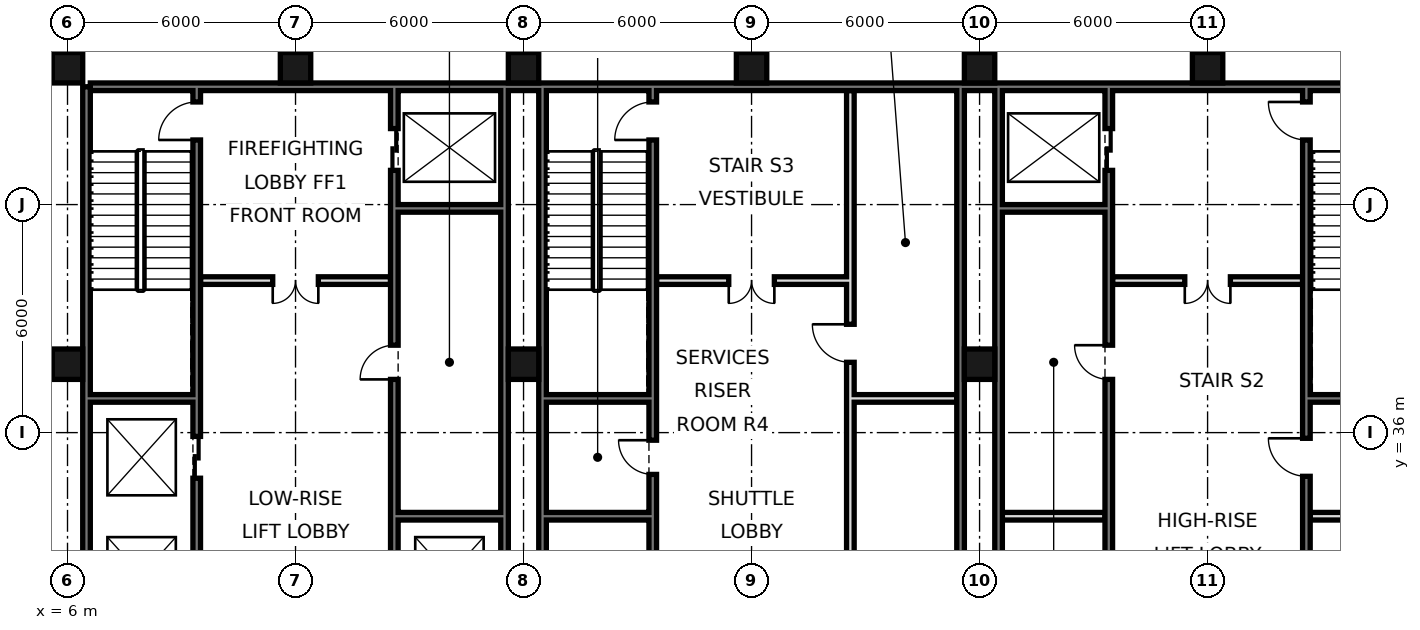
"""IFC4 building model, lengths in metres.
Left out: names, types, materials, properties, quantities, classifications, styles, units other than length and angle.
Written with IfcOpenShell. Run it as: python <this file> out.ifc"""

import sys

from ifc_helpers import new_model, si_unit, direction, frame, frame_2d, origin, origin_2d, place, context, subcontext, project, spatial, rectangle, hollow_rectangle, extrude, element, fill, save


model = new_model("IFC4")
c1 = context("Model", 3, precision=1e-05, world=origin(), true_north=direction((0.0, 1.0)))
c2 = subcontext(c1, "Body", "Model", "MODEL_VIEW")
j1 = project(units=[si_unit("LENGTHUNIT", "METRE"), si_unit("PLANEANGLEUNIT", "RADIAN")], contexts=[c1])
p1 = place(None, origin())
s1 = spatial("IfcSite", under=j1, at=p1, CompositionType="ELEMENT")
p2 = place(p1, origin())
s2 = spatial("IfcBuilding", under=s1, at=p2, CompositionType="ELEMENT")
p3 = place(p2, frame((0.0, 0.0, 30.0)))
s3 = spatial("IfcBuildingStorey", under=s2, at=p3, CompositionType="ELEMENT", Elevation=30.0)
for number, where, z_axis, x_axis in (
    (1, (6.0, 37.8, 0.0), (0.0, 0.0, 1.0), (1.0, 0.0, 0.0)),
    (2, (6.0, 45.6, 0.0), (0.0, 0.0, 1.0), (1.0, 0.0, 0.0)),
    (3, (12.0, 45.6, 0.0), (0.0, 0.0, 1.0), (1.0, 0.0, 0.0)),
    (4, (18.0, 37.8, 0.0), (0.0, 0.0, 1.0), (1.0, 0.0, 0.0)),
    (5, (18.0, 45.6, 0.0), (0.0, 0.0, 1.0), (1.0, 0.0, 0.0)),
    (6, (24.0, 45.6, 0.0), (0.0, 0.0, 1.0), (1.0, 0.0, 0.0)),
    (7, (30.0, 37.8, 0.0), (0.0, 0.0, 1.0), (1.0, 0.0, 0.0)),
    (8, (30.0, 45.6, 0.0), (0.0, 0.0, 1.0), (1.0, 0.0, 0.0)),
    (9, (36.0, 45.6, 0.0), (0.0, 0.0, 1.0), (1.0, 0.0, 0.0)),
):
    element("IfcColumn", number, at=place(p3, frame(where, z_axis=z_axis, x_axis=x_axis)), inside=s3, PredefinedType="COLUMN", context=c2, shape_type="SweptSolid", body=[
        extrude(hollow_rectangle(XDim=0.8, YDim=0.8, WallThickness=0.07, at=origin_2d()), origin(), (0.0, 0.0, 1.0), 4.8),
    ])
p4 = place(p3, frame((6.5, 21.6, 0.0), z_axis=(0.0, 0.0, 1.0), x_axis=(0.0, 1.0, 0.0)))
e10 = element("IfcWall", 10, at=p4, inside=s3, PredefinedType="SOLIDWALL", context=c2, shape_type="SweptSolid", body=[
    extrude(rectangle(XDim=23.5, YDim=0.2, at=frame_2d((11.75, 0.0))), origin(), (0.0, 0.0, 1.0), 4.4),
])
p5 = place(p3, frame((6.6, 45.1, 0.0), z_axis=(0.0, 0.0, 1.0), x_axis=(1.0, 0.0, 0.0)))
e11 = element("IfcWall", 11, at=p5, inside=s3, PredefinedType="SOLIDWALL", context=c2, shape_type="SweptSolid", body=[
    extrude(rectangle(XDim=34.8, YDim=0.2, at=frame_2d((17.4, 0.0))), origin(), (0.0, 0.0, 1.0), 4.4),
])
for number, where, z_axis, x_axis in (
    (12, (17.5, 27.6, 0.0), (0.0, 0.0, 1.0), (0.0, 1.0, 0.0)),
    (13, (18.5, 27.6, 0.0), (0.0, 0.0, 1.0), (0.0, 1.0, 0.0)),
    (14, (29.5, 27.6, 0.0), (0.0, 0.0, 1.0), (0.0, 1.0, 0.0)),
    (15, (30.5, 27.6, 0.0), (0.0, 0.0, 1.0), (0.0, 1.0, 0.0)),
):
    element("IfcWall", number, at=place(p3, frame(where, z_axis=z_axis, x_axis=x_axis)), inside=s3, PredefinedType="SOLIDWALL", context=c2, shape_type="SweptSolid", body=[
        extrude(rectangle(XDim=17.5, YDim=0.2, at=frame_2d((8.75, 0.0))), origin(), (0.0, 0.0, 1.0), 4.4),
    ])
p6 = place(p3, frame((14.6, 27.5, 0.0), z_axis=(0.0, 0.0, 1.0), x_axis=(0.0, 1.0, 0.0)))
e16 = element("IfcWall", 16, at=p6, inside=s3, PredefinedType="SOLIDWALL", context=c2, shape_type="SweptSolid", body=[
    extrude(rectangle(XDim=17.5, YDim=0.2, at=frame_2d((8.75, 0.0))), origin(), (0.0, 0.0, 1.0), 4.4),
])
p7 = place(p6, frame((1.1, 0.0, 0.0)))
e17 = element("IfcOpeningElement", 17, at=p7, cuts=e16, PredefinedType="OPENING", context=c2, shape_type="SweptSolid", body=[
    extrude(rectangle(XDim=1.1, YDim=2.1, at=frame_2d((0.55, 1.05))), frame((0.0, 0.11, 0.0), z_axis=(0.0, -1.0, 0.0), x_axis=(1.0, 0.0, 0.0)), (0.0, 0.0, 1.0), 0.22),
])
p8 = place(p6, frame((4.2, 0.0, 0.0)))
e18 = element("IfcOpeningElement", 18, at=p8, cuts=e16, PredefinedType="OPENING", context=c2, shape_type="SweptSolid", body=[
    extrude(rectangle(XDim=1.1, YDim=2.1, at=frame_2d((0.55, 1.05))), frame((0.0, 0.11, 0.0), z_axis=(0.0, -1.0, 0.0), x_axis=(1.0, 0.0, 0.0)), (0.0, 0.0, 1.0), 0.22),
])
p9 = place(p6, frame((15.4, 0.0, 0.0)))
e19 = element("IfcOpeningElement", 19, at=p9, cuts=e16, PredefinedType="OPENING", context=c2, shape_type="SweptSolid", body=[
    extrude(rectangle(XDim=1.1, YDim=2.1, at=frame_2d((0.55, 1.05))), frame((0.0, 0.11, 0.0), z_axis=(0.0, -1.0, 0.0), x_axis=(1.0, 0.0, 0.0)), (0.0, 0.0, 1.0), 0.22),
])
p10 = place(p6, frame((9.9, 0.0, 0.0)))
e20 = element("IfcOpeningElement", 20, at=p10, cuts=e16, PredefinedType="OPENING", context=c2, shape_type="SweptSolid", body=[
    extrude(rectangle(XDim=0.9, YDim=2.1, at=frame_2d((0.45, 1.05))), frame((0.0, 0.11, 0.0), z_axis=(0.0, -1.0, 0.0), x_axis=(1.0, 0.0, 0.0)), (0.0, 0.0, 1.0), 0.22),
])
p11 = place(p3, frame((21.4, 27.5, 0.0), z_axis=(0.0, 0.0, 1.0), x_axis=(0.0, 1.0, 0.0)))
e21 = element("IfcWall", 21, at=p11, inside=s3, PredefinedType="SOLIDWALL", context=c2, shape_type="SweptSolid", body=[
    extrude(rectangle(XDim=17.5, YDim=0.2, at=frame_2d((8.75, 0.0))), origin(), (0.0, 0.0, 1.0), 4.4),
])
p12 = place(p11, frame((16.2, 0.0, 0.0)))
e22 = element("IfcOpeningElement", 22, at=p12, cuts=e21, PredefinedType="OPENING", context=c2, shape_type="SweptSolid", body=[
    extrude(rectangle(XDim=1.0, YDim=2.1, at=frame_2d((0.5, 1.05))), frame((0.0, 0.11, 0.0), z_axis=(0.0, -1.0, 0.0), x_axis=(1.0, 0.0, 0.0)), (0.0, 0.0, 1.0), 0.22),
])
p13 = place(p11, frame((7.4, 0.0, 0.0)))
e23 = element("IfcOpeningElement", 23, at=p13, cuts=e21, PredefinedType="OPENING", context=c2, shape_type="SweptSolid", body=[
    extrude(rectangle(XDim=0.9, YDim=2.1, at=frame_2d((0.45, 1.05))), frame((0.0, 0.11, 0.0), z_axis=(0.0, -1.0, 0.0), x_axis=(1.0, 0.0, 0.0)), (0.0, 0.0, 1.0), 0.22),
])
p14 = place(p3, frame((26.6, 27.5, 0.0), z_axis=(0.0, 0.0, 1.0), x_axis=(0.0, 1.0, 0.0)))
e24 = element("IfcWall", 24, at=p14, inside=s3, PredefinedType="SOLIDWALL", context=c2, shape_type="SweptSolid", body=[
    extrude(rectangle(XDim=17.5, YDim=0.2, at=frame_2d((8.75, 0.0))), origin(), (0.0, 0.0, 1.0), 4.4),
])
p15 = place(p14, frame((4.3, 0.0, 0.0)))
e25 = element("IfcOpeningElement", 25, at=p15, cuts=e24, PredefinedType="OPENING", context=c2, shape_type="SweptSolid", body=[
    extrude(rectangle(XDim=0.9, YDim=2.1, at=frame_2d((0.45, 1.05))), frame((0.0, 0.11, 0.0), z_axis=(0.0, -1.0, 0.0), x_axis=(1.0, 0.0, 0.0)), (0.0, 0.0, 1.0), 0.22),
])
p16 = place(p14, frame((10.35, 0.0, 0.0)))
e26 = element("IfcOpeningElement", 26, at=p16, cuts=e24, PredefinedType="OPENING", context=c2, shape_type="SweptSolid", body=[
    extrude(rectangle(XDim=1.0, YDim=2.1, at=frame_2d((0.5, 1.05))), frame((0.0, 0.11, 0.0), z_axis=(0.0, -1.0, 0.0), x_axis=(1.0, 0.0, 0.0)), (0.0, 0.0, 1.0), 0.22),
])
p17 = place(p3, frame((33.4, 27.5, 0.0), z_axis=(0.0, 0.0, 1.0), x_axis=(0.0, 1.0, 0.0)))
e27 = element("IfcWall", 27, at=p17, inside=s3, PredefinedType="SOLIDWALL", context=c2, shape_type="SweptSolid", body=[
    extrude(rectangle(XDim=17.5, YDim=0.2, at=frame_2d((8.75, 0.0))), origin(), (0.0, 0.0, 1.0), 4.4),
])
p18 = place(p17, frame((15.4, 0.0, 0.0)))
e28 = element("IfcOpeningElement", 28, at=p18, cuts=e27, PredefinedType="OPENING", context=c2, shape_type="SweptSolid", body=[
    extrude(rectangle(XDim=1.1, YDim=2.1, at=frame_2d((0.55, 1.05))), frame((0.0, 0.11, 0.0), z_axis=(0.0, -1.0, 0.0), x_axis=(1.0, 0.0, 0.0)), (0.0, 0.0, 1.0), 0.22),
])
p19 = place(p17, frame((2.7, 0.0, 0.0)))
e29 = element("IfcOpeningElement", 29, at=p19, cuts=e27, PredefinedType="OPENING", context=c2, shape_type="SweptSolid", body=[
    extrude(rectangle(XDim=1.0, YDim=2.1, at=frame_2d((0.5, 1.05))), frame((0.0, 0.11, 0.0), z_axis=(0.0, -1.0, 0.0), x_axis=(1.0, 0.0, 0.0)), (0.0, 0.0, 1.0), 0.22),
])
p20 = place(p17, frame((9.9, 0.0, 0.0)))
e30 = element("IfcOpeningElement", 30, at=p20, cuts=e27, PredefinedType="OPENING", context=c2, shape_type="SweptSolid", body=[
    extrude(rectangle(XDim=0.9, YDim=2.1, at=frame_2d((0.45, 1.05))), frame((0.0, 0.11, 0.0), z_axis=(0.0, -1.0, 0.0), x_axis=(1.0, 0.0, 0.0)), (0.0, 0.0, 1.0), 0.22),
])
p21 = place(p3, frame((38.6, 21.6, 0.0), z_axis=(0.0, 0.0, 1.0), x_axis=(0.0, 1.0, 0.0)))
e31 = element("IfcWall", 31, at=p21, inside=s3, PredefinedType="SOLIDWALL", context=c2, shape_type="SweptSolid", body=[
    extrude(rectangle(XDim=23.4, YDim=0.2, at=frame_2d((11.7, 0.0))), origin(), (0.0, 0.0, 1.0), 4.4),
])
p22 = place(p21, frame((8.6, 0.0, 0.0)))
e32 = element("IfcOpeningElement", 32, at=p22, cuts=e31, PredefinedType="OPENING", context=c2, shape_type="SweptSolid", body=[
    extrude(rectangle(XDim=1.0, YDim=2.1, at=frame_2d((0.5, 1.05))), frame((0.0, 0.11, 0.0), z_axis=(0.0, -1.0, 0.0), x_axis=(1.0, 0.0, 0.0)), (0.0, 0.0, 1.0), 0.22),
])
p23 = place(p21, frame((13.25, 0.0, 0.0)))
e33 = element("IfcOpeningElement", 33, at=p23, cuts=e31, PredefinedType="OPENING", context=c2, shape_type="SweptSolid", body=[
    extrude(rectangle(XDim=1.0, YDim=2.1, at=frame_2d((0.5, 1.05))), frame((0.0, 0.11, 0.0), z_axis=(0.0, -1.0, 0.0), x_axis=(1.0, 0.0, 0.0)), (0.0, 0.0, 1.0), 0.22),
])
p24 = place(p21, frame((22.1, 0.0, 0.0)))
e34 = element("IfcOpeningElement", 34, at=p24, cuts=e31, PredefinedType="OPENING", context=c2, shape_type="SweptSolid", body=[
    extrude(rectangle(XDim=1.0, YDim=2.1, at=frame_2d((0.5, 1.05))), frame((0.0, 0.11, 0.0), z_axis=(0.0, -1.0, 0.0), x_axis=(1.0, 0.0, 0.0)), (0.0, 0.0, 1.0), 0.22),
])
p25 = place(p21, frame((0.175, 0.0, 0.0)))
e35 = element("IfcOpeningElement", 35, at=p25, cuts=e31, PredefinedType="OPENING", context=c2, shape_type="SweptSolid", body=[
    extrude(rectangle(XDim=0.9, YDim=2.1, at=frame_2d((0.45, 1.05))), frame((0.0, 0.11, 0.0), z_axis=(0.0, -1.0, 0.0), x_axis=(1.0, 0.0, 0.0)), (0.0, 0.0, 1.0), 0.22),
])
p26 = place(p3, frame((9.4, 21.6, 0.0), z_axis=(0.0, 0.0, 1.0), x_axis=(0.0, 1.0, 0.0)))
e36 = element("IfcWall", 36, at=p26, inside=s3, PredefinedType="SOLIDWALL", context=c2, shape_type="SweptSolid", body=[
    extrude(rectangle(XDim=23.4, YDim=0.2, at=frame_2d((11.7, 0.0))), origin(), (0.0, 0.0, 1.0), 4.4),
])
p27 = place(p26, frame((7.0, 0.0, 0.0)))
e37 = element("IfcOpeningElement", 37, at=p27, cuts=e36, PredefinedType="OPENING", context=c2, shape_type="SweptSolid", body=[
    extrude(rectangle(XDim=1.1, YDim=2.1, at=frame_2d((0.55, 1.05))), frame((0.0, 0.11, 0.0), z_axis=(0.0, -1.0, 0.0), x_axis=(1.0, 0.0, 0.0)), (0.0, 0.0, 1.0), 0.22),
])
p28 = place(p26, frame((10.1, 0.0, 0.0)))
e38 = element("IfcOpeningElement", 38, at=p28, cuts=e36, PredefinedType="OPENING", context=c2, shape_type="SweptSolid", body=[
    extrude(rectangle(XDim=1.1, YDim=2.1, at=frame_2d((0.55, 1.05))), frame((0.0, 0.11, 0.0), z_axis=(0.0, -1.0, 0.0), x_axis=(1.0, 0.0, 0.0)), (0.0, 0.0, 1.0), 0.22),
])
p29 = place(p26, frame((13.2, 0.0, 0.0)))
e39 = element("IfcOpeningElement", 39, at=p29, cuts=e36, PredefinedType="OPENING", context=c2, shape_type="SweptSolid", body=[
    extrude(rectangle(XDim=1.1, YDim=2.1, at=frame_2d((0.55, 1.05))), frame((0.0, 0.11, 0.0), z_axis=(0.0, -1.0, 0.0), x_axis=(1.0, 0.0, 0.0)), (0.0, 0.0, 1.0), 0.22),
])
p30 = place(p26, frame((22.1, 0.0, 0.0)))
e40 = element("IfcOpeningElement", 40, at=p30, cuts=e36, PredefinedType="OPENING", context=c2, shape_type="SweptSolid", body=[
    extrude(rectangle(XDim=1.0, YDim=2.1, at=frame_2d((0.5, 1.05))), frame((0.0, 0.11, 0.0), z_axis=(0.0, -1.0, 0.0), x_axis=(1.0, 0.0, 0.0)), (0.0, 0.0, 1.0), 0.22),
])
p31 = place(p26, frame((0.175, 0.0, 0.0)))
e41 = element("IfcOpeningElement", 41, at=p31, cuts=e36, PredefinedType="OPENING", context=c2, shape_type="SweptSolid", body=[
    extrude(rectangle(XDim=0.9, YDim=2.1, at=frame_2d((0.45, 1.05))), frame((0.0, 0.11, 0.0), z_axis=(0.0, -1.0, 0.0), x_axis=(1.0, 0.0, 0.0)), (0.0, 0.0, 1.0), 0.22),
])
for number, where, z_axis, x_axis in (
    (42, (14.7, 33.8, 0.0), (0.0, 0.0, 1.0), (1.0, 0.0, 0.0)),
    (43, (18.6, 33.8, 0.0), (0.0, 0.0, 1.0), (1.0, 0.0, 0.0)),
    (44, (30.6, 33.8, 0.0), (0.0, 0.0, 1.0), (1.0, 0.0, 0.0)),
):
    element("IfcWall", number, at=place(p3, frame(where, z_axis=z_axis, x_axis=x_axis)), inside=s3, PredefinedType="SOLIDWALL", context=c2, shape_type="SweptSolid", body=[
        extrude(rectangle(XDim=2.7, YDim=0.2, at=frame_2d((1.35, 0.0))), origin(), (0.0, 0.0, 1.0), 4.4),
    ])
p32 = place(p3, frame((38.7, 33.8, 0.0), z_axis=(0.0, 0.0, 1.0), x_axis=(1.0, 0.0, 0.0)))
e45 = element("IfcWall", 45, at=p32, inside=s3, PredefinedType="PARTITIONING", context=c2, shape_type="SweptSolid", body=[
    extrude(rectangle(XDim=2.7, YDim=0.2, at=frame_2d((1.35, 0.0))), origin(), (0.0, 0.0, 1.0), 4.4),
])
for number, where, z_axis, x_axis in (
    (46, (18.6, 36.9, 0.0), (0.0, 0.0, 1.0), (1.0, 0.0, 0.0)),
    (47, (26.7, 36.9, 0.0), (0.0, 0.0, 1.0), (1.0, 0.0, 0.0)),
    (48, (38.7, 36.9, 0.0), (0.0, 0.0, 1.0), (1.0, 0.0, 0.0)),
    (49, (6.6, 36.9, 0.0), (0.0, 0.0, 1.0), (1.0, 0.0, 0.0)),
):
    element("IfcWall", number, at=place(p3, frame(where, z_axis=z_axis, x_axis=x_axis)), inside=s3, PredefinedType="SOLIDWALL", context=c2, shape_type="SweptSolid", body=[
        extrude(rectangle(XDim=2.7, YDim=0.2, at=frame_2d((1.35, 0.0))), origin(), (0.0, 0.0, 1.0), 4.4),
    ])
p33 = place(p3, frame((21.5, 40.0, 0.0), z_axis=(0.0, 0.0, 1.0), x_axis=(1.0, 0.0, 0.0)))
e50 = element("IfcWall", 50, at=p33, inside=s3, PredefinedType="PARTITIONING", context=c2, shape_type="SweptSolid", body=[
    extrude(rectangle(XDim=5.0, YDim=0.2, at=frame_2d((2.5, 0.0))), origin(), (0.0, 0.0, 1.0), 4.4),
])
p34 = place(p33, frame((1.9, 0.0, 0.0)))
e51 = element("IfcOpeningElement", 51, at=p34, cuts=e50, PredefinedType="OPENING", context=c2, shape_type="SweptSolid", body=[
    extrude(rectangle(XDim=1.2, YDim=2.1, at=frame_2d((0.6, 1.05))), frame((0.0, 0.11, 0.0), z_axis=(0.0, -1.0, 0.0), x_axis=(1.0, 0.0, 0.0)), (0.0, 0.0, 1.0), 0.22),
])
p35 = place(p3, frame((33.5, 40.0, 0.0), z_axis=(0.0, 0.0, 1.0), x_axis=(1.0, 0.0, 0.0)))
e52 = element("IfcWall", 52, at=p35, inside=s3, PredefinedType="PARTITIONING", context=c2, shape_type="SweptSolid", body=[
    extrude(rectangle(XDim=5.0, YDim=0.2, at=frame_2d((2.5, 0.0))), origin(), (0.0, 0.0, 1.0), 4.4),
])
p36 = place(p35, frame((1.9, 0.0, 0.0)))
e53 = element("IfcOpeningElement", 53, at=p36, cuts=e52, PredefinedType="OPENING", context=c2, shape_type="SweptSolid", body=[
    extrude(rectangle(XDim=1.2, YDim=2.1, at=frame_2d((0.6, 1.05))), frame((0.0, 0.11, 0.0), z_axis=(0.0, -1.0, 0.0), x_axis=(1.0, 0.0, 0.0)), (0.0, 0.0, 1.0), 0.22),
])
p37 = place(p3, frame((9.5, 40.0, 0.0), z_axis=(0.0, 0.0, 1.0), x_axis=(1.0, 0.0, 0.0)))
e54 = element("IfcWall", 54, at=p37, inside=s3, PredefinedType="PARTITIONING", context=c2, shape_type="SweptSolid", body=[
    extrude(rectangle(XDim=5.0, YDim=0.2, at=frame_2d((2.5, 0.0))), origin(), (0.0, 0.0, 1.0), 4.4),
])
p38 = place(p37, frame((1.9, 0.0, 0.0)))
e55 = element("IfcOpeningElement", 55, at=p38, cuts=e54, PredefinedType="OPENING", context=c2, shape_type="SweptSolid", body=[
    extrude(rectangle(XDim=1.2, YDim=2.1, at=frame_2d((0.6, 1.05))), frame((0.0, 0.11, 0.0), z_axis=(0.0, -1.0, 0.0), x_axis=(1.0, 0.0, 0.0)), (0.0, 0.0, 1.0), 0.22),
])
for number, where, z_axis, x_axis in (
    (56, (14.7, 41.9, 0.0), (0.0, 0.0, 1.0), (1.0, 0.0, 0.0)),
    (57, (30.6, 41.9, 0.0), (0.0, 0.0, 1.0), (1.0, 0.0, 0.0)),
):
    element("IfcWall", number, at=place(p3, frame(where, z_axis=z_axis, x_axis=x_axis)), inside=s3, PredefinedType="SOLIDWALL", context=c2, shape_type="SweptSolid", body=[
        extrude(rectangle(XDim=2.7, YDim=0.2, at=frame_2d((1.35, 0.0))), origin(), (0.0, 0.0, 1.0), 4.4),
    ])
p39 = place(p38, frame((1.2, 0.0, 0.0), z_axis=(0.0, 0.0, 1.0), x_axis=(-1.0, 0.0, 0.0)))
e58 = element("IfcDoor", 58, at=p39, inside=s3, OperationType="DOUBLE_DOOR_SINGLE_SWING", PredefinedType="DOOR", context=c2, shape_type="SweptSolid", body=[
    extrude(rectangle(XDim=1.2, YDim=2.1, at=frame_2d((0.6, 1.05))), frame((0.0, 0.025, 0.0), z_axis=(0.0, -1.0, 0.0), x_axis=(1.0, 0.0, 0.0)), (0.0, 0.0, 1.0), 0.05),
])
fill(e55, e58)
p40 = place(p34, frame((1.2, 0.0, 0.0), z_axis=(0.0, 0.0, 1.0), x_axis=(-1.0, 0.0, 0.0)))
e59 = element("IfcDoor", 59, at=p40, inside=s3, OperationType="DOUBLE_DOOR_SINGLE_SWING", PredefinedType="DOOR", context=c2, shape_type="SweptSolid", body=[
    extrude(rectangle(XDim=1.2, YDim=2.1, at=frame_2d((0.6, 1.05))), frame((0.0, 0.025, 0.0), z_axis=(0.0, -1.0, 0.0), x_axis=(1.0, 0.0, 0.0)), (0.0, 0.0, 1.0), 0.05),
])
fill(e51, e59)
p41 = place(p36, frame((1.2, 0.0, 0.0), z_axis=(0.0, 0.0, 1.0), x_axis=(-1.0, 0.0, 0.0)))
e60 = element("IfcDoor", 60, at=p41, inside=s3, OperationType="DOUBLE_DOOR_SINGLE_SWING", PredefinedType="DOOR", context=c2, shape_type="SweptSolid", body=[
    extrude(rectangle(XDim=1.2, YDim=2.1, at=frame_2d((0.6, 1.05))), frame((0.0, 0.025, 0.0), z_axis=(0.0, -1.0, 0.0), x_axis=(1.0, 0.0, 0.0)), (0.0, 0.0, 1.0), 0.05),
])
fill(e53, e60)
p42 = place(p18, origin())
e61 = element("IfcDoor", 61, at=p42, inside=s3, OperationType="DOUBLE_DOOR_SLIDING", PredefinedType="DOOR", context=c2, shape_type="SweptSolid", body=[
    extrude(rectangle(XDim=1.1, YDim=2.1, at=frame_2d((0.55, 1.05))), frame((0.0, 0.025, 0.0), z_axis=(0.0, -1.0, 0.0), x_axis=(1.0, 0.0, 0.0)), (0.0, 0.0, 1.0), 0.05),
])
fill(e28, e61)
p43 = place(p9, origin())
e62 = element("IfcDoor", 62, at=p43, inside=s3, OperationType="DOUBLE_DOOR_SLIDING", PredefinedType="DOOR", context=c2, shape_type="SweptSolid", body=[
    extrude(rectangle(XDim=1.1, YDim=2.1, at=frame_2d((0.55, 1.05))), frame((0.0, 0.025, 0.0), z_axis=(0.0, -1.0, 0.0), x_axis=(1.0, 0.0, 0.0)), (0.0, 0.0, 1.0), 0.05),
])
fill(e19, e62)
p44 = place(p29, origin())
e63 = element("IfcDoor", 63, at=p44, inside=s3, OperationType="DOUBLE_DOOR_SLIDING", PredefinedType="DOOR", context=c2, shape_type="SweptSolid", body=[
    extrude(rectangle(XDim=1.1, YDim=2.1, at=frame_2d((0.55, 1.05))), frame((0.0, 0.025, 0.0), z_axis=(0.0, -1.0, 0.0), x_axis=(1.0, 0.0, 0.0)), (0.0, 0.0, 1.0), 0.05),
])
fill(e39, e63)
p45 = place(p23, frame((1.0, 0.0, 0.0), z_axis=(0.0, 0.0, 1.0), x_axis=(-1.0, 0.0, 0.0)))
e64 = element("IfcDoor", 64, at=p45, inside=s3, OperationType="SINGLE_SWING_LEFT", PredefinedType="DOOR", context=c2, shape_type="SweptSolid", body=[
    extrude(rectangle(XDim=1.0, YDim=2.1, at=frame_2d((0.5, 1.05))), frame((0.0, 0.025, 0.0), z_axis=(0.0, -1.0, 0.0), x_axis=(1.0, 0.0, 0.0)), (0.0, 0.0, 1.0), 0.05),
])
fill(e33, e64)
p46 = place(p30, origin())
e65 = element("IfcDoor", 65, at=p46, inside=s3, OperationType="SINGLE_SWING_LEFT", PredefinedType="DOOR", context=c2, shape_type="SweptSolid", body=[
    extrude(rectangle(XDim=1.0, YDim=2.1, at=frame_2d((0.5, 1.05))), frame((0.0, 0.025, 0.0), z_axis=(0.0, -1.0, 0.0), x_axis=(1.0, 0.0, 0.0)), (0.0, 0.0, 1.0), 0.05),
])
fill(e40, e65)
p47 = place(p24, frame((1.0, 0.0, 0.0), z_axis=(0.0, 0.0, 1.0), x_axis=(-1.0, 0.0, 0.0)))
e66 = element("IfcDoor", 66, at=p47, inside=s3, OperationType="SINGLE_SWING_LEFT", PredefinedType="DOOR", context=c2, shape_type="SweptSolid", body=[
    extrude(rectangle(XDim=1.0, YDim=2.1, at=frame_2d((0.5, 1.05))), frame((0.0, 0.025, 0.0), z_axis=(0.0, -1.0, 0.0), x_axis=(1.0, 0.0, 0.0)), (0.0, 0.0, 1.0), 0.05),
])
fill(e34, e66)
p48 = place(p12, origin())
e67 = element("IfcDoor", 67, at=p48, inside=s3, OperationType="SINGLE_SWING_LEFT", PredefinedType="DOOR", context=c2, shape_type="SweptSolid", body=[
    extrude(rectangle(XDim=1.0, YDim=2.1, at=frame_2d((0.5, 1.05))), frame((0.0, 0.025, 0.0), z_axis=(0.0, -1.0, 0.0), x_axis=(1.0, 0.0, 0.0)), (0.0, 0.0, 1.0), 0.05),
])
fill(e22, e67)
p49 = place(p10, origin())
e68 = element("IfcDoor", 68, at=p49, inside=s3, OperationType="SINGLE_SWING_LEFT", PredefinedType="DOOR", context=c2, shape_type="SweptSolid", body=[
    extrude(rectangle(XDim=0.9, YDim=2.1, at=frame_2d((0.45, 1.05))), frame((0.0, 0.025, 0.0), z_axis=(0.0, -1.0, 0.0), x_axis=(1.0, 0.0, 0.0)), (0.0, 0.0, 1.0), 0.05),
])
fill(e20, e68)
p50 = place(p20, frame((0.9, 0.0, 0.0), z_axis=(0.0, 0.0, 1.0), x_axis=(-1.0, 0.0, 0.0)))
e69 = element("IfcDoor", 69, at=p50, inside=s3, OperationType="SINGLE_SWING_LEFT", PredefinedType="DOOR", context=c2, shape_type="SweptSolid", body=[
    extrude(rectangle(XDim=0.9, YDim=2.1, at=frame_2d((0.45, 1.05))), frame((0.0, 0.025, 0.0), z_axis=(0.0, -1.0, 0.0), x_axis=(1.0, 0.0, 0.0)), (0.0, 0.0, 1.0), 0.05),
])
fill(e30, e69)
p51 = place(p13, frame((0.9, 0.0, 0.0), z_axis=(0.0, 0.0, 1.0), x_axis=(-1.0, 0.0, 0.0)))
e70 = element("IfcDoor", 70, at=p51, inside=s3, OperationType="SINGLE_SWING_LEFT", PredefinedType="DOOR", context=c2, shape_type="SweptSolid", body=[
    extrude(rectangle(XDim=0.9, YDim=2.1, at=frame_2d((0.45, 1.05))), frame((0.0, 0.025, 0.0), z_axis=(0.0, -1.0, 0.0), x_axis=(1.0, 0.0, 0.0)), (0.0, 0.0, 1.0), 0.05),
])
fill(e23, e70)
p52 = place(p16, frame((1.0, 0.0, 0.0), z_axis=(0.0, 0.0, 1.0), x_axis=(-1.0, 0.0, 0.0)))
e71 = element("IfcDoor", 71, at=p52, inside=s3, OperationType="SINGLE_SWING_LEFT", PredefinedType="DOOR", context=c2, shape_type="SweptSolid", body=[
    extrude(rectangle(XDim=1.0, YDim=2.1, at=frame_2d((0.5, 1.05))), frame((0.0, 0.025, 0.0), z_axis=(0.0, -1.0, 0.0), x_axis=(1.0, 0.0, 0.0)), (0.0, 0.0, 1.0), 0.05),
])
fill(e26, e71)
save(model, sys.argv[1])
